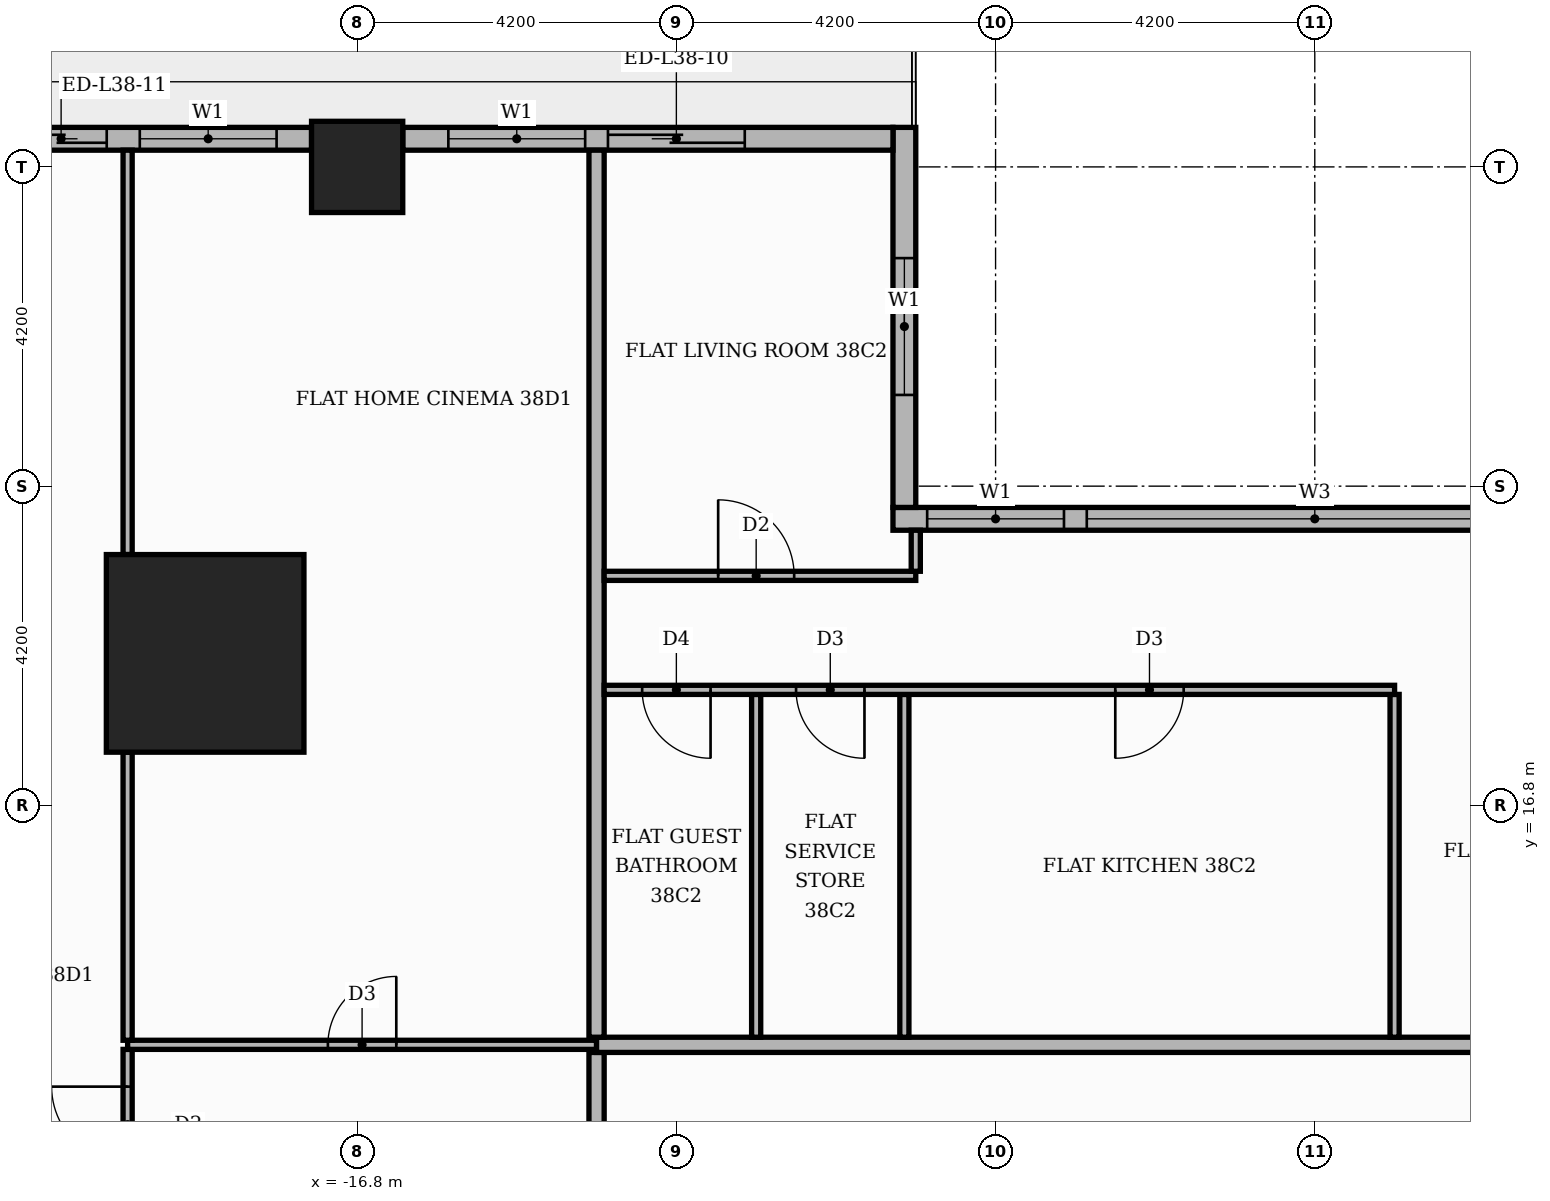
"""IFC4 building model, lengths in metres.
Left out: names, types, materials, properties, quantities, classifications, styles, units other than length and angle.
Written with IfcOpenShell. Run it as: python <this file> out.ifc"""

import sys

from ifc_helpers import new_model, si_unit, direction, frame, frame_2d, origin, origin_2d, place, context, subcontext, project, spatial, rectangle, extrude, element, fill, save


model = new_model("IFC4")
c1 = context("Model", 3, precision=1e-05, world=origin(), true_north=direction((0.0, 1.0)))
c2 = subcontext(c1, "Body", "Model", "MODEL_VIEW")
j1 = project(units=[si_unit("LENGTHUNIT", "METRE"), si_unit("PLANEANGLEUNIT", "RADIAN")], contexts=[c1])
p1 = place(None, origin())
s1 = spatial("IfcSite", under=j1, at=p1, CompositionType="ELEMENT")
p2 = place(p1, origin())
s2 = spatial("IfcBuilding", under=s1, at=p2, CompositionType="ELEMENT")
p3 = place(p2, frame((0.0, 0.0, 161.1)))
s3 = spatial("IfcBuildingStorey", under=s2, at=p3, CompositionType="ELEMENT", Elevation=161.1)
p4 = place(p3, frame((-18.8, 18.8, 0.0), z_axis=(0.0, 0.0, 1.0), x_axis=(1.0, 0.0, 0.0)))
e1 = element("IfcColumn", 1, at=p4, inside=s3, PredefinedType="COLUMN", context=c2, shape_type="SweptSolid", body=[
    extrude(rectangle(XDim=2.6, YDim=2.6, at=origin_2d()), origin(), (0.0, 0.0, 1.0), 3.9),
])
p5 = place(p3, frame((-16.8, 25.2, 0.0), z_axis=(0.0, 0.0, 1.0), x_axis=(1.0, 0.0, 0.0)))
e2 = element("IfcColumn", 2, at=p5, inside=s3, PredefinedType="COLUMN", context=c2, shape_type="SweptSolid", body=[
    extrude(rectangle(XDim=1.2, YDim=1.2, at=origin_2d()), origin(), (0.0, 0.0, 1.0), 3.9),
])
p6 = place(p3, frame((9.45, 20.57, 0.0), z_axis=(0.0, 0.0, 1.0), x_axis=(-1.0, 0.0, 0.0)))
e3 = element("IfcWall", 3, at=p6, inside=s3, PredefinedType="STANDARD", context=c2, shape_type="SweptSolid", body=[
    extrude(rectangle(XDim=19.2, YDim=0.3, at=frame_2d((9.6, 0.0))), origin(), (0.0, 0.0, 1.0), 3.48),
])
p7 = place(p6, frame((0.15, 0.0, 0.9)))
e4 = element("IfcOpeningElement", 4, at=p7, cuts=e3, PredefinedType="OPENING", context=c2, shape_type="SweptSolid", body=[
    extrude(rectangle(XDim=3.9, YDim=2.1, at=frame_2d((1.95, 1.05))), frame((0.0, 0.16, 0.0), z_axis=(0.0, -1.0, 0.0), x_axis=(1.0, 0.0, 0.0)), (0.0, 0.0, 1.0), 0.32),
])
p8 = place(p6, frame((4.35, 0.0, 0.9)))
e5 = element("IfcOpeningElement", 5, at=p8, cuts=e3, PredefinedType="OPENING", context=c2, shape_type="SweptSolid", body=[
    extrude(rectangle(XDim=6.0, YDim=2.1, at=frame_2d((3.0, 1.05))), frame((0.0, 0.16, 0.0), z_axis=(0.0, -1.0, 0.0), x_axis=(1.0, 0.0, 0.0)), (0.0, 0.0, 1.0), 0.32),
])
p9 = place(p6, frame((10.65, 0.0, 0.9)))
e6 = element("IfcOpeningElement", 6, at=p9, cuts=e3, PredefinedType="OPENING", context=c2, shape_type="SweptSolid", body=[
    extrude(rectangle(XDim=6.0, YDim=2.1, at=frame_2d((3.0, 1.05))), frame((0.0, 0.16, 0.0), z_axis=(0.0, -1.0, 0.0), x_axis=(1.0, 0.0, 0.0)), (0.0, 0.0, 1.0), 0.32),
])
p10 = place(p6, frame((16.95, 0.0, 0.9)))
e7 = element("IfcOpeningElement", 7, at=p10, cuts=e3, PredefinedType="OPENING", context=c2, shape_type="SweptSolid", body=[
    extrude(rectangle(XDim=1.8, YDim=2.1, at=frame_2d((0.9, 1.05))), frame((0.0, 0.16, 0.0), z_axis=(0.0, -1.0, 0.0), x_axis=(1.0, 0.0, 0.0)), (0.0, 0.0, 1.0), 0.32),
])
p11 = place(p3, frame((-9.6, 20.72, 0.0), z_axis=(0.0, 0.0, 1.0), x_axis=(0.0, 1.0, 0.0)))
e8 = element("IfcWall", 8, at=p11, inside=s3, PredefinedType="STANDARD", context=c2, shape_type="SweptSolid", body=[
    extrude(rectangle(XDim=5.0, YDim=0.3, at=frame_2d((2.5, 0.0))), origin(), (0.0, 0.0, 1.0), 3.48),
])
p12 = place(p11, frame((1.48, 0.0, 0.9)))
e9 = element("IfcOpeningElement", 9, at=p12, cuts=e8, PredefinedType="OPENING", context=c2, shape_type="SweptSolid", body=[
    extrude(rectangle(XDim=1.8, YDim=2.1, at=frame_2d((0.9, 1.05))), frame((0.0, 0.16, 0.0), z_axis=(0.0, -1.0, 0.0), x_axis=(1.0, 0.0, 0.0)), (0.0, 0.0, 1.0), 0.32),
])
p13 = place(p3, frame((-9.75, 25.57, 0.0), z_axis=(0.0, 0.0, 1.0), x_axis=(-1.0, 0.0, 0.0)))
e10 = element("IfcWall", 10, at=p13, inside=s3, PredefinedType="STANDARD", context=c2, shape_type="SweptSolid", body=[
    extrude(rectangle(XDim=6.45, YDim=0.3, at=frame_2d((3.225, 0.0))), origin(), (0.0, 0.0, 1.0), 3.48),
])
p14 = place(p13, frame((1.95, 0.0, 0.0)))
e11 = element("IfcOpeningElement", 11, at=p14, cuts=e10, PredefinedType="OPENING", context=c2, shape_type="SweptSolid", body=[
    extrude(rectangle(XDim=1.8, YDim=2.4, at=frame_2d((0.9, 1.2))), frame((0.0, 0.16, 0.0), z_axis=(0.0, -1.0, 0.0), x_axis=(1.0, 0.0, 0.0)), (0.0, 0.0, 1.0), 0.32),
])
p15 = place(p13, frame((4.05, 0.0, 0.9)))
e12 = element("IfcOpeningElement", 12, at=p15, cuts=e10, PredefinedType="OPENING", context=c2, shape_type="SweptSolid", body=[
    extrude(rectangle(XDim=1.8, YDim=2.1, at=frame_2d((0.9, 1.05))), frame((0.0, 0.16, 0.0), z_axis=(0.0, -1.0, 0.0), x_axis=(1.0, 0.0, 0.0)), (0.0, 0.0, 1.0), 0.32),
])
p16 = place(p3, frame((-17.4, 25.57, 0.0), z_axis=(0.0, 0.0, 1.0), x_axis=(-1.0, 0.0, 0.0)))
e13 = element("IfcWall", 13, at=p16, inside=s3, PredefinedType="STANDARD", context=c2, shape_type="SweptSolid", body=[
    extrude(rectangle(XDim=4.32, YDim=0.3, at=frame_2d((2.16, 0.0))), origin(), (0.0, 0.0, 1.0), 3.48),
])
p17 = place(p16, frame((2.695, 0.0, 0.0)))
e14 = element("IfcOpeningElement", 14, at=p17, cuts=e13, PredefinedType="OPENING", context=c2, shape_type="SweptSolid", body=[
    extrude(rectangle(XDim=1.2, YDim=2.4, at=frame_2d((0.6, 1.2))), frame((0.0, 0.16, 0.0), z_axis=(0.0, -1.0, 0.0), x_axis=(1.0, 0.0, 0.0)), (0.0, 0.0, 1.0), 0.32),
])
p18 = place(p16, frame((0.46, 0.0, 0.9)))
e15 = element("IfcOpeningElement", 15, at=p18, cuts=e13, PredefinedType="OPENING", context=c2, shape_type="SweptSolid", body=[
    extrude(rectangle(XDim=1.8, YDim=2.1, at=frame_2d((0.9, 1.05))), frame((0.0, 0.16, 0.0), z_axis=(0.0, -1.0, 0.0), x_axis=(1.0, 0.0, 0.0)), (0.0, 0.0, 1.0), 0.32),
])
p19 = place(p3, frame((-13.65, 11.1, 0.0), z_axis=(0.0, 0.0, 1.0), x_axis=(0.0, 1.0, 0.0)))
e16 = element("IfcWall", 16, at=p19, inside=s3, PredefinedType="PARTITIONING", context=c2, shape_type="SweptSolid", body=[
    extrude(rectangle(XDim=2.45, YDim=0.2, at=frame_2d((1.225, 0.0))), origin(), (0.0, 0.0, 1.0), 3.48),
])
p20 = place(p3, frame((-19.82, 11.61, 0.0), z_axis=(0.0, 0.0, 1.0), x_axis=(0.0, 1.0, 0.0)))
e17 = element("IfcWall", 17, at=p20, inside=s3, PredefinedType="PARTITIONING", context=c2, shape_type="SweptSolid", body=[
    extrude(rectangle(XDim=1.98, YDim=0.12, at=frame_2d((0.99, 0.0))), origin(), (0.0, 0.0, 1.0), 3.48),
])
p21 = place(p20, frame((0.49, 0.0, 0.0)))
e18 = element("IfcOpeningElement", 18, at=p21, cuts=e17, PredefinedType="OPENING", context=c2, shape_type="SweptSolid", body=[
    extrude(rectangle(XDim=1.0, YDim=2.1, at=frame_2d((0.5, 1.05))), frame((0.0, 0.07, 0.0), z_axis=(0.0, -1.0, 0.0), x_axis=(1.0, 0.0, 0.0)), (0.0, 0.0, 1.0), 0.14),
])
p22 = place(p3, frame((-19.82, 13.65, 0.0), z_axis=(0.0, 0.0, 1.0), x_axis=(1.0, 0.0, 0.0)))
e19 = element("IfcWall", 19, at=p22, inside=s3, PredefinedType="PARTITIONING", context=c2, shape_type="SweptSolid", body=[
    extrude(rectangle(XDim=6.17, YDim=0.12, at=frame_2d((3.085, 0.0))), origin(), (0.0, 0.0, 1.0), 3.48),
])
p23 = place(p22, frame((2.635, 0.0, 0.0)))
e20 = element("IfcOpeningElement", 20, at=p23, cuts=e19, PredefinedType="OPENING", context=c2, shape_type="SweptSolid", body=[
    extrude(rectangle(XDim=0.9, YDim=2.1, at=frame_2d((0.45, 1.05))), frame((0.0, 0.07, 0.0), z_axis=(0.0, -1.0, 0.0), x_axis=(1.0, 0.0, 0.0)), (0.0, 0.0, 1.0), 0.14),
])
p24 = place(p3, frame((-13.65, 13.65, 0.0), z_axis=(0.0, 0.0, 1.0), x_axis=(1.0, 0.0, 0.0)))
e21 = element("IfcWall", 21, at=p24, inside=s3, PredefinedType="PARTITIONING", context=c2, shape_type="SweptSolid", body=[
    extrude(rectangle(XDim=39.07, YDim=0.2, at=frame_2d((19.535, 0.0))), origin(), (0.0, 0.0, 1.0), 3.48),
])
p25 = place(p24, frame((24.65, 0.0, 0.0)))
e22 = element("IfcOpeningElement", 22, at=p25, cuts=e21, PredefinedType="OPENING", context=c2, shape_type="SweptSolid", body=[
    extrude(rectangle(XDim=1.1, YDim=2.4, at=frame_2d((0.55, 1.2))), frame((0.0, 0.11, 0.0), z_axis=(0.0, -1.0, 0.0), x_axis=(1.0, 0.0, 0.0)), (0.0, 0.0, 1.0), 0.22),
])
p26 = place(p24, frame((12.05, 0.0, 0.0)))
e23 = element("IfcOpeningElement", 23, at=p26, cuts=e21, PredefinedType="OPENING", context=c2, shape_type="SweptSolid", body=[
    extrude(rectangle(XDim=1.1, YDim=2.4, at=frame_2d((0.55, 1.2))), frame((0.0, 0.11, 0.0), z_axis=(0.0, -1.0, 0.0), x_axis=(1.0, 0.0, 0.0)), (0.0, 0.0, 1.0), 0.22),
])
p27 = place(p3, frame((-19.82, 13.71, 0.0), z_axis=(0.0, 0.0, 1.0), x_axis=(0.0, 1.0, 0.0)))
e24 = element("IfcWall", 24, at=p27, inside=s3, PredefinedType="PARTITIONING", context=c2, shape_type="SweptSolid", body=[
    extrude(rectangle(XDim=3.79, YDim=0.12, at=frame_2d((1.895, 0.0))), origin(), (0.0, 0.0, 1.0), 3.48),
])
p28 = place(p3, frame((-13.65, 13.75, 0.0), z_axis=(0.0, 0.0, 1.0), x_axis=(0.0, 1.0, 0.0)))
e25 = element("IfcWall", 25, at=p28, inside=s3, PredefinedType="PARTITIONING", context=c2, shape_type="SweptSolid", body=[
    extrude(rectangle(XDim=11.67, YDim=0.2, at=frame_2d((5.835, 0.0))), origin(), (0.0, 0.0, 1.0), 3.48),
])
for number, where, z_axis, x_axis in (
    (26, (-11.55, 13.75, 0.0), (0.0, 0.0, 1.0), (0.0, 1.0, 0.0)),
    (27, (-9.6, 13.75, 0.0), (0.0, 0.0, 1.0), (0.0, 1.0, 0.0)),
    (28, (-3.15, 13.75, 0.0), (0.0, 0.0, 1.0), (0.0, 1.0, 0.0)),
):
    element("IfcWall", number, at=place(p3, frame(where, z_axis=z_axis, x_axis=x_axis)), inside=s3, PredefinedType="PARTITIONING", context=c2, shape_type="SweptSolid", body=[
        extrude(rectangle(XDim=4.51, YDim=0.12, at=frame_2d((2.255, 0.0))), origin(), (0.0, 0.0, 1.0), 3.48),
    ])
p29 = place(p3, frame((-13.55, 18.32, 0.0), z_axis=(0.0, 0.0, 1.0), x_axis=(1.0, 0.0, 0.0)))
e29 = element("IfcWall", 29, at=p29, inside=s3, PredefinedType="PARTITIONING", context=c2, shape_type="SweptSolid", body=[
    extrude(rectangle(XDim=10.4, YDim=0.12, at=frame_2d((5.2, 0.0))), origin(), (0.0, 0.0, 1.0), 3.48),
])
p30 = place(p29, frame((6.725, 0.0, 0.0)))
e30 = element("IfcOpeningElement", 30, at=p30, cuts=e29, PredefinedType="OPENING", context=c2, shape_type="SweptSolid", body=[
    extrude(rectangle(XDim=0.9, YDim=2.1, at=frame_2d((0.45, 1.05))), frame((0.0, 0.07, 0.0), z_axis=(0.0, -1.0, 0.0), x_axis=(1.0, 0.0, 0.0)), (0.0, 0.0, 1.0), 0.14),
])
p31 = place(p29, frame((2.525, 0.0, 0.0)))
e31 = element("IfcOpeningElement", 31, at=p31, cuts=e29, PredefinedType="OPENING", context=c2, shape_type="SweptSolid", body=[
    extrude(rectangle(XDim=0.9, YDim=2.1, at=frame_2d((0.45, 1.05))), frame((0.0, 0.07, 0.0), z_axis=(0.0, -1.0, 0.0), x_axis=(1.0, 0.0, 0.0)), (0.0, 0.0, 1.0), 0.14),
])
p32 = place(p29, frame((0.5, 0.0, 0.0)))
e32 = element("IfcOpeningElement", 32, at=p32, cuts=e29, PredefinedType="OPENING", context=c2, shape_type="SweptSolid", body=[
    extrude(rectangle(XDim=0.9, YDim=2.1, at=frame_2d((0.45, 1.05))), frame((0.0, 0.07, 0.0), z_axis=(0.0, -1.0, 0.0), x_axis=(1.0, 0.0, 0.0)), (0.0, 0.0, 1.0), 0.14),
])
p33 = place(p3, frame((-13.55, 19.82, 0.0), z_axis=(0.0, 0.0, 1.0), x_axis=(1.0, 0.0, 0.0)))
e33 = element("IfcWall", 33, at=p33, inside=s3, PredefinedType="PARTITIONING", context=c2, shape_type="SweptSolid", body=[
    extrude(rectangle(XDim=4.1, YDim=0.12, at=frame_2d((2.05, 0.0))), origin(), (0.0, 0.0, 1.0), 3.48),
])
p34 = place(p33, frame((1.5, 0.0, 0.0)))
e34 = element("IfcOpeningElement", 34, at=p34, cuts=e33, PredefinedType="OPENING", context=c2, shape_type="SweptSolid", body=[
    extrude(rectangle(XDim=1.0, YDim=2.1, at=frame_2d((0.5, 1.05))), frame((0.0, 0.07, 0.0), z_axis=(0.0, -1.0, 0.0), x_axis=(1.0, 0.0, 0.0)), (0.0, 0.0, 1.0), 0.14),
])
p35 = place(p3, frame((-9.45, 19.88, 0.0), z_axis=(0.0, 0.0, 1.0), x_axis=(0.0, 1.0, 0.0)))
e35 = element("IfcWall", 35, at=p35, inside=s3, PredefinedType="PARTITIONING", context=c2, shape_type="SweptSolid", body=[
    extrude(rectangle(XDim=0.54, YDim=0.12, at=frame_2d((0.27, 0.0))), origin(), (0.0, 0.0, 1.0), 3.48),
])
p36 = place(p3, frame((-19.82, 20.1, 0.0), z_axis=(0.0, 0.0, 1.0), x_axis=(0.0, 1.0, 0.0)))
e36 = element("IfcWall", 36, at=p36, inside=s3, PredefinedType="PARTITIONING", context=c2, shape_type="SweptSolid", body=[
    extrude(rectangle(XDim=5.32, YDim=0.12, at=frame_2d((2.66, 0.0))), origin(), (0.0, 0.0, 1.0), 3.48),
])
p37 = place(p9, origin())
e37 = element("IfcWindow", 37, at=p37, inside=s3, PartitioningType="SINGLE_PANEL", PredefinedType="WINDOW", context=c2, shape_type="SweptSolid", body=[
    extrude(rectangle(XDim=6.0, YDim=2.1, at=frame_2d((3.0, 1.05))), frame((0.0, 0.03, 0.0), z_axis=(0.0, -1.0, 0.0), x_axis=(1.0, 0.0, 0.0)), (0.0, 0.0, 1.0), 0.06),
])
fill(e6, e37)
p38 = place(p10, origin())
e38 = element("IfcWindow", 38, at=p38, inside=s3, PartitioningType="SINGLE_PANEL", PredefinedType="WINDOW", context=c2, shape_type="SweptSolid", body=[
    extrude(rectangle(XDim=1.8, YDim=2.1, at=frame_2d((0.9, 1.05))), frame((0.0, 0.03, 0.0), z_axis=(0.0, -1.0, 0.0), x_axis=(1.0, 0.0, 0.0)), (0.0, 0.0, 1.0), 0.06),
])
fill(e7, e38)
p39 = place(p12, origin())
e39 = element("IfcWindow", 39, at=p39, inside=s3, PartitioningType="SINGLE_PANEL", PredefinedType="WINDOW", context=c2, shape_type="SweptSolid", body=[
    extrude(rectangle(XDim=1.8, YDim=2.1, at=frame_2d((0.9, 1.05))), frame((0.0, 0.03, 0.0), z_axis=(0.0, -1.0, 0.0), x_axis=(1.0, 0.0, 0.0)), (0.0, 0.0, 1.0), 0.06),
])
fill(e9, e39)
p40 = place(p14, origin())
e40 = element("IfcDoor", 40, at=p40, inside=s3, OperationType="SLIDING_TO_RIGHT", PredefinedType="DOOR", context=c2, shape_type="SweptSolid", body=[
    extrude(rectangle(XDim=1.8, YDim=2.4, at=frame_2d((0.9, 1.2))), frame((0.0, 0.025, 0.0), z_axis=(0.0, -1.0, 0.0), x_axis=(1.0, 0.0, 0.0)), (0.0, 0.0, 1.0), 0.05),
])
fill(e11, e40)
p41 = place(p15, origin())
e41 = element("IfcWindow", 41, at=p41, inside=s3, PartitioningType="SINGLE_PANEL", PredefinedType="WINDOW", context=c2, shape_type="SweptSolid", body=[
    extrude(rectangle(XDim=1.8, YDim=2.1, at=frame_2d((0.9, 1.05))), frame((0.0, 0.03, 0.0), z_axis=(0.0, -1.0, 0.0), x_axis=(1.0, 0.0, 0.0)), (0.0, 0.0, 1.0), 0.06),
])
fill(e12, e41)
p42 = place(p17, origin())
e42 = element("IfcDoor", 42, at=p42, inside=s3, OperationType="SLIDING_TO_LEFT", PredefinedType="DOOR", context=c2, shape_type="SweptSolid", body=[
    extrude(rectangle(XDim=1.2, YDim=2.4, at=frame_2d((0.6, 1.2))), frame((0.0, 0.025, 0.0), z_axis=(0.0, -1.0, 0.0), x_axis=(1.0, 0.0, 0.0)), (0.0, 0.0, 1.0), 0.05),
])
fill(e14, e42)
p43 = place(p18, origin())
e43 = element("IfcWindow", 43, at=p43, inside=s3, PartitioningType="SINGLE_PANEL", PredefinedType="WINDOW", context=c2, shape_type="SweptSolid", body=[
    extrude(rectangle(XDim=1.8, YDim=2.1, at=frame_2d((0.9, 1.05))), frame((0.0, 0.03, 0.0), z_axis=(0.0, -1.0, 0.0), x_axis=(1.0, 0.0, 0.0)), (0.0, 0.0, 1.0), 0.06),
])
fill(e15, e43)
p44 = place(p30, frame((0.9, 0.0, 0.0), z_axis=(0.0, 0.0, 1.0), x_axis=(-1.0, 0.0, 0.0)))
e44 = element("IfcDoor", 44, at=p44, inside=s3, OperationType="SINGLE_SWING_LEFT", PredefinedType="DOOR", context=c2, shape_type="SweptSolid", body=[
    extrude(rectangle(XDim=0.9, YDim=2.1, at=frame_2d((0.45, 1.05))), frame((0.0, 0.025, 0.0), z_axis=(0.0, -1.0, 0.0), x_axis=(1.0, 0.0, 0.0)), (0.0, 0.0, 1.0), 0.05),
])
fill(e30, e44)
p45 = place(p31, frame((0.9, 0.0, 0.0), z_axis=(0.0, 0.0, 1.0), x_axis=(-1.0, 0.0, 0.0)))
e45 = element("IfcDoor", 45, at=p45, inside=s3, OperationType="SINGLE_SWING_RIGHT", PredefinedType="DOOR", context=c2, shape_type="SweptSolid", body=[
    extrude(rectangle(XDim=0.9, YDim=2.1, at=frame_2d((0.45, 1.05))), frame((0.0, 0.025, 0.0), z_axis=(0.0, -1.0, 0.0), x_axis=(1.0, 0.0, 0.0)), (0.0, 0.0, 1.0), 0.05),
])
fill(e31, e45)
p46 = place(p32, frame((0.9, 0.0, 0.0), z_axis=(0.0, 0.0, 1.0), x_axis=(-1.0, 0.0, 0.0)))
e46 = element("IfcDoor", 46, at=p46, inside=s3, OperationType="SINGLE_SWING_RIGHT", PredefinedType="DOOR", context=c2, shape_type="SweptSolid", body=[
    extrude(rectangle(XDim=0.9, YDim=2.1, at=frame_2d((0.45, 1.05))), frame((0.0, 0.025, 0.0), z_axis=(0.0, -1.0, 0.0), x_axis=(1.0, 0.0, 0.0)), (0.0, 0.0, 1.0), 0.05),
])
fill(e32, e46)
p47 = place(p34, origin())
e47 = element("IfcDoor", 47, at=p47, inside=s3, OperationType="SINGLE_SWING_LEFT", PredefinedType="DOOR", context=c2, shape_type="SweptSolid", body=[
    extrude(rectangle(XDim=1.0, YDim=2.1, at=frame_2d((0.5, 1.05))), frame((0.0, 0.025, 0.0), z_axis=(0.0, -1.0, 0.0), x_axis=(1.0, 0.0, 0.0)), (0.0, 0.0, 1.0), 0.05),
])
fill(e34, e47)
p48 = place(p23, origin())
e48 = element("IfcDoor", 48, at=p48, inside=s3, OperationType="SINGLE_SWING_RIGHT", PredefinedType="DOOR", context=c2, shape_type="SweptSolid", body=[
    extrude(rectangle(XDim=0.9, YDim=2.1, at=frame_2d((0.45, 1.05))), frame((0.0, 0.025, 0.0), z_axis=(0.0, -1.0, 0.0), x_axis=(1.0, 0.0, 0.0)), (0.0, 0.0, 1.0), 0.05),
])
fill(e20, e48)
p49 = place(p21, origin())
e49 = element("IfcDoor", 49, at=p49, inside=s3, OperationType="SINGLE_SWING_RIGHT", PredefinedType="DOOR", context=c2, shape_type="SweptSolid", body=[
    extrude(rectangle(XDim=1.0, YDim=2.1, at=frame_2d((0.5, 1.05))), frame((0.0, 0.025, 0.0), z_axis=(0.0, -1.0, 0.0), x_axis=(1.0, 0.0, 0.0)), (0.0, 0.0, 1.0), 0.05),
])
fill(e18, e49)
save(model, sys.argv[1])
